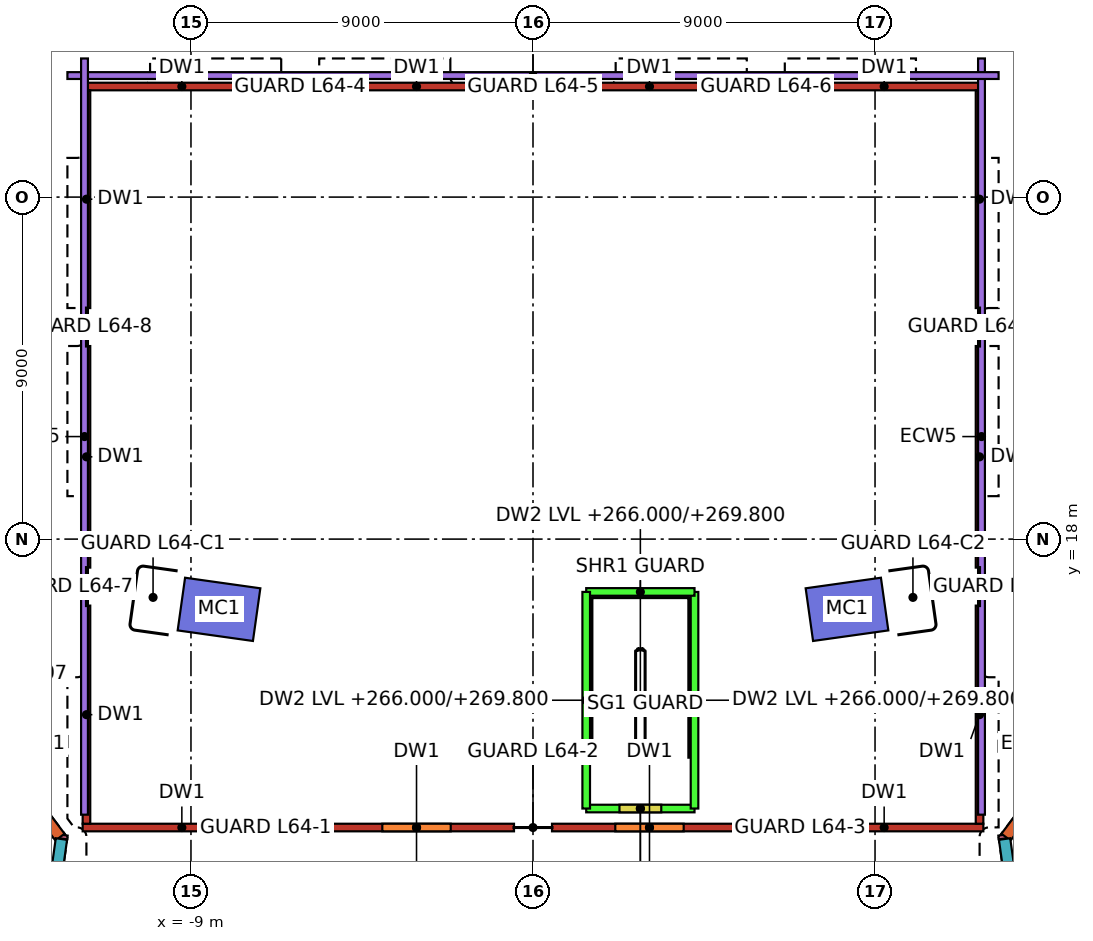
"""IFC4 building model, lengths in metres.
Left out: names, types, materials, properties, quantities, classifications, styles, units other than length and angle.
Written with IfcOpenShell. Run it as: python <this file> out.ifc"""

import sys

from ifc_helpers import new_model, si_unit, direction, frame, frame_2d, origin, origin_2d, place, context, subcontext, project, spatial, rectangle, hollow_rectangle, extrude, element, fill, save


model = new_model("IFC4")
c1 = context("Model", 3, precision=1e-05, world=origin(), true_north=direction((0.0, 1.0)))
c2 = subcontext(c1, "Body", "Model", "MODEL_VIEW")
j1 = project(units=[si_unit("LENGTHUNIT", "METRE"), si_unit("PLANEANGLEUNIT", "RADIAN")], contexts=[c1])
p1 = place(None, origin())
s1 = spatial("IfcSite", under=j1, at=p1, CompositionType="ELEMENT")
p2 = place(p1, origin())
s2 = spatial("IfcBuilding", under=s1, at=p2, CompositionType="ELEMENT")
p3 = place(p2, frame((0.0, 0.0, 266.0)))
s3 = spatial("IfcBuildingStorey", under=s2, at=p3, CompositionType="ELEMENT", Elevation=266.0)
for number, where, z_axis, x_axis in (
    (1, (-8.262, 16.151, 0.0), (0.0, 0.0, 1.0), (-0.99, 0.139, 0.0)),
    (2, (8.262, 16.151, 0.0), (0.0, 0.0, 1.0), (0.99, 0.139, 0.0)),
):
    element("IfcColumn", number, at=place(p3, frame(where, z_axis=z_axis, x_axis=x_axis)), inside=s3, PredefinedType="COLUMN", context=c2, shape_type="SweptSolid", body=[
        extrude(hollow_rectangle(XDim=2.0, YDim=1.4, WallThickness=0.06, at=origin_2d()), origin(), (0.0, 0.0, 1.0), 3.8),
    ])
p4 = place(p3, frame((-12.409, 10.107, 0.0), z_axis=(0.0, 0.0, 1.0), x_axis=(-0.1391723, -0.9902682, 0.0)))
e3 = element("IfcWall", 3, at=p4, inside=s3, PredefinedType="STANDARD", context=c2, shape_type="SweptSolid", body=[
    extrude(rectangle(XDim=28.876, YDim=0.3, at=frame_2d((14.438, 0.0))), origin(), (0.0, 0.0, 1.0), 2.5),
])
p5 = place(p4, frame((10.75, 0.0, 0.0)))
e4 = element("IfcOpeningElement", 4, at=p5, cuts=e3, PredefinedType="OPENING", context=c2, shape_type="SweptSolid", body=[
    extrude(rectangle(XDim=1.8, YDim=2.4, at=frame_2d((0.9, 1.2))), frame((0.0, 0.15, 0.0), z_axis=(0.0, -1.0, 0.0), x_axis=(1.0, 0.0, 0.0)), (0.0, 0.0, 1.0), 0.3),
])
p6 = place(p3, frame((-16.126, 15.041, 0.0), z_axis=(0.0, 0.0, 1.0), x_axis=(0.6018141, -0.7986362, 0.0)))
e5 = element("IfcWall", 5, at=p6, inside=s3, PredefinedType="STANDARD", context=c2, shape_type="SweptSolid", body=[
    extrude(rectangle(XDim=6.116, YDim=0.3, at=frame_2d((3.058, 0.0))), origin(), (0.0, 0.0, 1.0), 3.3),
])
p7 = place(p6, frame((1.958, 0.0, 0.6)))
e6 = element("IfcOpeningElement", 6, at=p7, cuts=e5, PredefinedType="OPENING", context=c2, shape_type="SweptSolid", body=[
    extrude(rectangle(XDim=2.2, YDim=2.4, at=frame_2d((1.1, 1.2))), frame((0.0, 0.15, 0.0), z_axis=(0.0, -1.0, 0.0), x_axis=(1.0, 0.0, 0.0)), (0.0, 0.0, 1.0), 0.3),
])
p8 = place(p3, frame((12.409, 10.107, 0.0), z_axis=(0.0, 0.0, 1.0), x_axis=(0.1391723, -0.9902682, 0.0)))
e7 = element("IfcWall", 7, at=p8, inside=s3, PredefinedType="STANDARD", context=c2, shape_type="SweptSolid", body=[
    extrude(rectangle(XDim=28.876, YDim=0.3, at=frame_2d((14.438, 0.0))), origin(), (0.0, 0.0, 1.0), 2.5),
])
p9 = place(p8, frame((10.75, 0.0, 0.0)))
e8 = element("IfcOpeningElement", 8, at=p9, cuts=e7, PredefinedType="OPENING", context=c2, shape_type="SweptSolid", body=[
    extrude(rectangle(XDim=1.8, YDim=2.4, at=frame_2d((0.9, 1.2))), frame((0.0, 0.15, 0.0), z_axis=(0.0, -1.0, 0.0), x_axis=(1.0, 0.0, 0.0)), (0.0, 0.0, 1.0), 0.3),
])
p10 = place(p3, frame((16.126, 15.041, 0.0), z_axis=(0.0, 0.0, 1.0), x_axis=(-0.6018141, -0.7986362, 0.0)))
e9 = element("IfcWall", 9, at=p10, inside=s3, PredefinedType="STANDARD", context=c2, shape_type="SweptSolid", body=[
    extrude(rectangle(XDim=6.116, YDim=0.3, at=frame_2d((3.058, 0.0))), origin(), (0.0, 0.0, 1.0), 3.3),
])
p11 = place(p10, frame((1.958, 0.0, 0.6)))
e10 = element("IfcOpeningElement", 10, at=p11, cuts=e9, PredefinedType="OPENING", context=c2, shape_type="SweptSolid", body=[
    extrude(rectangle(XDim=2.2, YDim=2.4, at=frame_2d((1.1, 1.2))), frame((0.0, 0.15, 0.0), z_axis=(0.0, -1.0, 0.0), x_axis=(1.0, 0.0, 0.0)), (0.0, 0.0, 1.0), 0.3),
])
for number, where, z_axis, x_axis in (
    (11, (-16.757, 10.781, 0.0), (0.0, 0.0, 1.0), (0.99, -0.139, 0.0)),
    (12, (16.757, 10.781, 0.0), (0.0, 0.0, 1.0), (-0.99, -0.139, 0.0)),
):
    element("IfcWall", number, at=place(p3, frame(where, z_axis=z_axis, x_axis=x_axis)), inside=s3, PredefinedType="PARTITIONING", context=c2, shape_type="SweptSolid", body=[
        extrude(rectangle(XDim=4.55, YDim=0.1, at=frame_2d((2.275, 0.0))), origin(), (0.0, 0.0, 1.0), 3.3),
    ])
for number, where, z_axis, x_axis in (
    (13, (-11.85, 10.41, 0.0), (0.0, 0.0, 1.0), (1.0, 0.0, 0.0)),
    (14, (-11.85, 29.91, 0.0), (0.0, 0.0, 1.0), (1.0, 0.0, 0.0)),
):
    element("IfcWall", number, at=place(p3, frame(where, z_axis=z_axis, x_axis=x_axis)), inside=s3, PredefinedType="PARTITIONING", context=c2, shape_type="SweptSolid", body=[
        extrude(rectangle(XDim=5.22, YDim=0.2, at=frame_2d((2.61, 0.0))), origin(), (0.0, 0.0, 1.0), 3.3),
    ])
p12 = place(p3, frame((-5.63, 10.41, 0.0), z_axis=(0.0, 0.0, 1.0), x_axis=(1.0, 0.0, 0.0)))
e15 = element("IfcWall", 15, at=p12, inside=s3, PredefinedType="PARTITIONING", context=c2, shape_type="SweptSolid", body=[
    extrude(rectangle(XDim=5.13, YDim=0.2, at=frame_2d((2.565, 0.0))), origin(), (0.0, 0.0, 1.0), 3.3),
])
p13 = place(p12, frame((1.665, 0.0, 0.0)))
e16 = element("IfcOpeningElement", 16, at=p13, cuts=e15, PredefinedType="OPENING", context=c2, shape_type="SweptSolid", body=[
    extrude(rectangle(XDim=1.8, YDim=2.1, at=frame_2d((0.9, 1.05))), frame((0.0, 0.1, 0.0), z_axis=(0.0, -1.0, 0.0), x_axis=(1.0, 0.0, 0.0)), (0.0, 0.0, 1.0), 0.2),
])
p14 = place(p3, frame((-5.63, 29.91, 0.0), z_axis=(0.0, 0.0, 1.0), x_axis=(1.0, 0.0, 0.0)))
e17 = element("IfcWall", 17, at=p14, inside=s3, PredefinedType="PARTITIONING", context=c2, shape_type="SweptSolid", body=[
    extrude(rectangle(XDim=5.13, YDim=0.2, at=frame_2d((2.565, 0.0))), origin(), (0.0, 0.0, 1.0), 3.3),
])
p15 = place(p3, frame((0.5, 10.41, 0.0), z_axis=(0.0, 0.0, 1.0), x_axis=(1.0, 0.0, 0.0)))
e18 = element("IfcWall", 18, at=p15, inside=s3, PredefinedType="PARTITIONING", context=c2, shape_type="SweptSolid", body=[
    extrude(rectangle(XDim=5.13, YDim=0.2, at=frame_2d((2.565, 0.0))), origin(), (0.0, 0.0, 1.0), 3.3),
])
p16 = place(p15, frame((1.665, 0.0, 0.0)))
e19 = element("IfcOpeningElement", 19, at=p16, cuts=e18, PredefinedType="OPENING", context=c2, shape_type="SweptSolid", body=[
    extrude(rectangle(XDim=1.8, YDim=2.1, at=frame_2d((0.9, 1.05))), frame((0.0, 0.1, 0.0), z_axis=(0.0, -1.0, 0.0), x_axis=(1.0, 0.0, 0.0)), (0.0, 0.0, 1.0), 0.2),
])
p17 = place(p3, frame((0.5, 29.91, 0.0), z_axis=(0.0, 0.0, 1.0), x_axis=(1.0, 0.0, 0.0)))
e20 = element("IfcWall", 20, at=p17, inside=s3, PredefinedType="PARTITIONING", context=c2, shape_type="SweptSolid", body=[
    extrude(rectangle(XDim=5.13, YDim=0.2, at=frame_2d((2.565, 0.0))), origin(), (0.0, 0.0, 1.0), 3.3),
])
for number, where, z_axis, x_axis in (
    (21, (6.63, 10.41, 0.0), (0.0, 0.0, 1.0), (1.0, 0.0, 0.0)),
    (22, (6.63, 29.91, 0.0), (0.0, 0.0, 1.0), (1.0, 0.0, 0.0)),
):
    element("IfcWall", number, at=place(p3, frame(where, z_axis=z_axis, x_axis=x_axis)), inside=s3, PredefinedType="PARTITIONING", context=c2, shape_type="SweptSolid", body=[
        extrude(rectangle(XDim=5.22, YDim=0.2, at=frame_2d((2.61, 0.0))), origin(), (0.0, 0.0, 1.0), 3.3),
    ])
for number, where, z_axis, x_axis in (
    (23, (-11.75, 10.51, 0.0), (0.0, 0.0, 1.0), (0.0, 1.0, 0.0)),
    (24, (11.75, 10.51, 0.0), (0.0, 0.0, 1.0), (0.0, 1.0, 0.0)),
):
    element("IfcWall", number, at=place(p3, frame(where, z_axis=z_axis, x_axis=x_axis)), inside=s3, PredefinedType="PARTITIONING", context=c2, shape_type="SweptSolid", body=[
        extrude(rectangle(XDim=5.74, YDim=0.2, at=frame_2d((2.87, 0.0))), origin(), (0.0, 0.0, 1.0), 3.3),
    ])
for number, where, z_axis, x_axis in (
    (25, (-11.75, 17.25, 0.0), (0.0, 0.0, 1.0), (0.0, 1.0, 0.0)),
    (26, (11.75, 17.25, 0.0), (0.0, 0.0, 1.0), (0.0, 1.0, 0.0)),
):
    element("IfcWall", number, at=place(p3, frame(where, z_axis=z_axis, x_axis=x_axis)), inside=s3, PredefinedType="PARTITIONING", context=c2, shape_type="SweptSolid", body=[
        extrude(rectangle(XDim=5.83, YDim=0.2, at=frame_2d((2.915, 0.0))), origin(), (0.0, 0.0, 1.0), 3.3),
    ])
for number, where, z_axis, x_axis in (
    (27, (-11.75, 24.08, 0.0), (0.0, 0.0, 1.0), (0.0, 1.0, 0.0)),
    (28, (11.75, 24.08, 0.0), (0.0, 0.0, 1.0), (0.0, 1.0, 0.0)),
):
    element("IfcWall", number, at=place(p3, frame(where, z_axis=z_axis, x_axis=x_axis)), inside=s3, PredefinedType="PARTITIONING", context=c2, shape_type="SweptSolid", body=[
        extrude(rectangle(XDim=5.73, YDim=0.2, at=frame_2d((2.865, 0.0))), origin(), (0.0, 0.0, 1.0), 3.3),
    ])
p18 = place(p3, frame((1.4, 10.91, 0.0), z_axis=(0.0, 0.0, 1.0), x_axis=(1.0, 0.0, 0.0)))
e29 = element("IfcWall", 29, at=p18, inside=s3, PredefinedType="SHEAR", context=c2, shape_type="SweptSolid", body=[
    extrude(rectangle(XDim=2.85, YDim=0.2, at=frame_2d((1.425, 0.0))), origin(), (0.0, 0.0, 1.0), 3.8),
])
p19 = place(p18, frame((0.875, 0.0, 0.0)))
e30 = element("IfcOpeningElement", 30, at=p19, cuts=e29, PredefinedType="OPENING", context=c2, shape_type="SweptSolid", body=[
    extrude(rectangle(XDim=1.1, YDim=2.1, at=frame_2d((0.55, 1.05))), frame((0.0, 0.1, 0.0), z_axis=(0.0, -1.0, 0.0), x_axis=(1.0, 0.0, 0.0)), (0.0, 0.0, 1.0), 0.2),
])
p20 = place(p3, frame((4.25, 10.91, 0.0), z_axis=(0.0, 0.0, 1.0), x_axis=(0.0, 1.0, 0.0)))
e31 = element("IfcWall", 31, at=p20, inside=s3, PredefinedType="SHEAR", context=c2, shape_type="SweptSolid", body=[
    extrude(rectangle(XDim=5.7, YDim=0.2, at=frame_2d((2.85, 0.0))), origin(), (0.0, 0.0, 1.0), 3.8),
])
p21 = place(p3, frame((4.25, 16.61, 0.0), z_axis=(0.0, 0.0, 1.0), x_axis=(-1.0, 0.0, 0.0)))
e32 = element("IfcWall", 32, at=p21, inside=s3, PredefinedType="SHEAR", context=c2, shape_type="SweptSolid", body=[
    extrude(rectangle(XDim=2.85, YDim=0.2, at=frame_2d((1.425, 0.0))), origin(), (0.0, 0.0, 1.0), 3.8),
])
p22 = place(p3, frame((1.4, 16.61, 0.0), z_axis=(0.0, 0.0, 1.0), x_axis=(0.0, -1.0, 0.0)))
e33 = element("IfcWall", 33, at=p22, inside=s3, PredefinedType="SHEAR", context=c2, shape_type="SweptSolid", body=[
    extrude(rectangle(XDim=5.7, YDim=0.2, at=frame_2d((2.85, 0.0))), origin(), (0.0, 0.0, 1.0), 3.8),
])
p23 = place(p13, frame((1.8, 0.0, 0.0), z_axis=(0.0, 0.0, 1.0), x_axis=(-1.0, 0.0, 0.0)))
e34 = element("IfcDoor", 34, at=p23, inside=s3, OperationType="DOUBLE_DOOR_SINGLE_SWING", PredefinedType="DOOR", context=c2, shape_type="SweptSolid", body=[
    extrude(rectangle(XDim=0.895, YDim=2.1, at=frame_2d((0.448, 1.05))), frame((0.0, 0.025, 0.0), z_axis=(0.0, -1.0, 0.0), x_axis=(1.0, 0.0, 0.0)), (0.0, 0.0, 1.0), 0.05),
    extrude(rectangle(XDim=0.895, YDim=2.1, at=frame_2d((1.353, 1.05))), frame((0.0, 0.025, 0.0), z_axis=(0.0, -1.0, 0.0), x_axis=(1.0, 0.0, 0.0)), (0.0, 0.0, 1.0), 0.05),
])
fill(e16, e34)
p24 = place(p16, frame((1.8, 0.0, 0.0), z_axis=(0.0, 0.0, 1.0), x_axis=(-1.0, 0.0, 0.0)))
e35 = element("IfcDoor", 35, at=p24, inside=s3, OperationType="DOUBLE_DOOR_SINGLE_SWING", PredefinedType="DOOR", context=c2, shape_type="SweptSolid", body=[
    extrude(rectangle(XDim=0.895, YDim=2.1, at=frame_2d((0.448, 1.05))), frame((0.0, 0.025, 0.0), z_axis=(0.0, -1.0, 0.0), x_axis=(1.0, 0.0, 0.0)), (0.0, 0.0, 1.0), 0.05),
    extrude(rectangle(XDim=0.895, YDim=2.1, at=frame_2d((1.353, 1.05))), frame((0.0, 0.025, 0.0), z_axis=(0.0, -1.0, 0.0), x_axis=(1.0, 0.0, 0.0)), (0.0, 0.0, 1.0), 0.05),
])
fill(e19, e35)
p25 = place(p19, origin())
e36 = element("IfcDoor", 36, at=p25, inside=s3, OperationType="SINGLE_SWING_LEFT", PredefinedType="DOOR", context=c2, shape_type="SweptSolid", body=[
    extrude(rectangle(XDim=1.1, YDim=2.1, at=frame_2d((0.55, 1.05))), frame((0.0, 0.025, 0.0), z_axis=(0.0, -1.0, 0.0), x_axis=(1.0, 0.0, 0.0)), (0.0, 0.0, 1.0), 0.05),
])
fill(e30, e36)
save(model, sys.argv[1])
